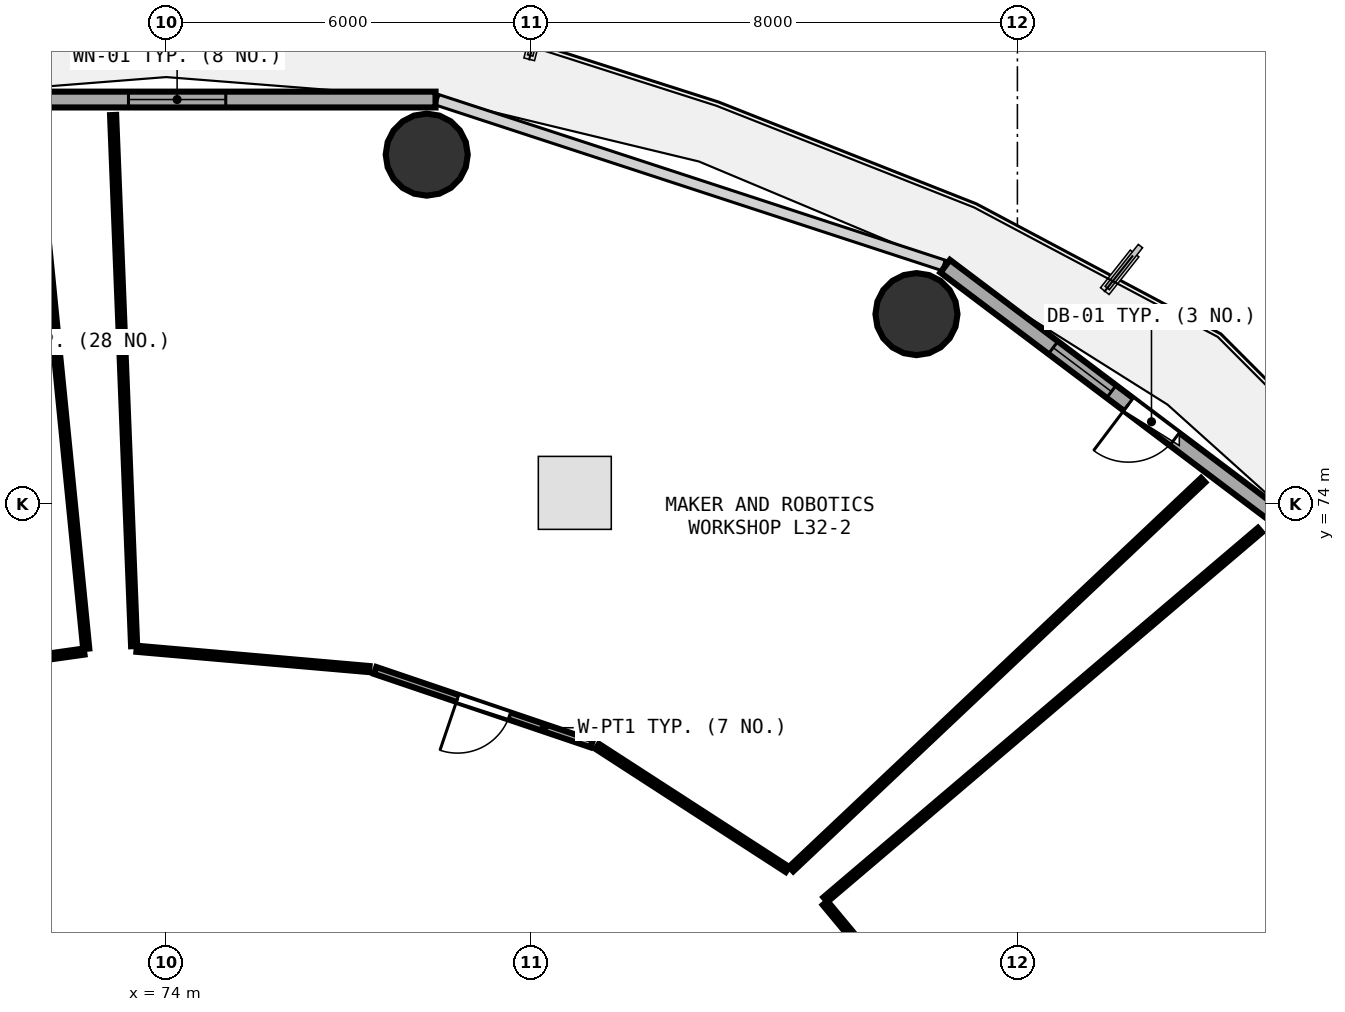
"""IFC4 building model, lengths in metres.
Left out: names, types, materials, properties, quantities, classifications, styles, units other than length and angle.
Written with IfcOpenShell. Run it as: python <this file> out.ifc"""

import sys

from ifc_helpers import new_model, si_unit, direction, frame, frame_2d, origin, origin_2d, place, context, subcontext, project, spatial, rectangle, circle, extrude, element, fill, save


model = new_model("IFC4")
c1 = context("Model", 3, precision=1e-05, world=origin(), true_north=direction((0.0, 1.0)))
c2 = subcontext(c1, "Body", "Model", "MODEL_VIEW")
j1 = project(units=[si_unit("LENGTHUNIT", "METRE"), si_unit("PLANEANGLEUNIT", "RADIAN")], contexts=[c1])
p1 = place(None, origin())
s1 = spatial("IfcSite", under=j1, at=p1, CompositionType="ELEMENT")
p2 = place(p1, origin())
s2 = spatial("IfcBuilding", under=s1, at=p2, CompositionType="ELEMENT")
p3 = place(p2, frame((0.0, 0.0, 125.1)))
s3 = spatial("IfcBuildingStorey", under=s2, at=p3, CompositionType="ELEMENT", Elevation=125.1)
for number, where, z_axis, x_axis in (
    (1, (86.34, 77.122, 0.0), (0.0, 0.0, 1.0), (1.0, 0.0, 0.0)),
    (2, (78.286, 79.745, 0.0), (0.0, 0.0, 1.0), (1.0, 0.0, 0.0)),
):
    element("IfcColumn", number, at=place(p3, frame(where, z_axis=z_axis, x_axis=x_axis)), inside=s3, PredefinedType="COLUMN", context=c2, shape_type="SweptSolid", body=[
        extrude(circle(Radius=0.675, at=origin_2d()), origin(), (0.0, 0.0, 1.0), 4.76),
    ])
p4 = place(p3, frame((93.599, 72.793, 0.0), z_axis=(0.0, 0.0, 1.0), x_axis=(-0.798501507879, 0.601992808857, 0.0)))
e3 = element("IfcWall", 3, at=p4, inside=s3, PredefinedType="SOLIDWALL", context=c2, shape_type="SweptSolid", body=[
    extrude(rectangle(XDim=8.499, YDim=0.26, at=frame_2d((4.25, 0.0))), origin(), (0.0, 0.0, 1.0), 4.345),
])
p5 = place(p4, frame((3.775, 0.0, 0.0)))
e4 = element("IfcOpeningElement", 4, at=p5, cuts=e3, PredefinedType="OPENING", context=c2, shape_type="SweptSolid", body=[
    extrude(rectangle(XDim=0.95, YDim=2.1, at=frame_2d((0.475, 1.05))), frame((0.0, 0.14, 0.0), z_axis=(0.0, -1.0, 0.0), x_axis=(1.0, 0.0, 0.0)), (0.0, 0.0, 1.0), 0.28),
])
p6 = place(p4, frame((5.075, 0.0, 0.85)))
e5 = element("IfcOpeningElement", 5, at=p6, cuts=e3, PredefinedType="OPENING", context=c2, shape_type="SweptSolid", body=[
    extrude(rectangle(XDim=1.2, YDim=1.45, at=frame_2d((0.6, 0.725))), frame((0.0, 0.14, 0.0), z_axis=(0.0, -1.0, 0.0), x_axis=(1.0, 0.0, 0.0)), (0.0, 0.0, 1.0), 0.28),
])
p7 = place(p3, frame((78.43, 80.651, 0.0), z_axis=(0.0, 0.0, 1.0), x_axis=(-1.0, 0.0, 0.0)))
e6 = element("IfcWall", 6, at=p7, inside=s3, PredefinedType="SOLIDWALL", context=c2, shape_type="SweptSolid", body=[
    extrude(rectangle(XDim=8.861, YDim=0.26, at=frame_2d((4.43, 0.0))), origin(), (0.0, 0.0, 1.0), 4.345),
])
p8 = place(p7, frame((3.45, 0.0, 0.85)))
e7 = element("IfcOpeningElement", 7, at=p8, cuts=e6, PredefinedType="OPENING", context=c2, shape_type="SweptSolid", body=[
    extrude(rectangle(XDim=1.6, YDim=1.45, at=frame_2d((0.8, 0.725))), frame((0.0, 0.14, 0.0), z_axis=(0.0, -1.0, 0.0), x_axis=(1.0, 0.0, 0.0)), (0.0, 0.0, 1.0), 0.28),
])
p9 = place(p3, frame((80.999, 70.054, 0.0), z_axis=(0.0, 0.0, 1.0), x_axis=(-0.947047812155, 0.321092574645, 0.0)))
e8 = element("IfcWall", 8, at=p9, inside=s3, PredefinedType="PARTITIONING", context=c2, shape_type="SweptSolid", body=[
    extrude(rectangle(XDim=3.761, YDim=0.12, at=frame_2d((1.88, 0.0))), origin(), (0.0, 0.0, 1.0), 2.345),
])
p10 = place(p9, frame((1.43, 0.0, 0.0)))
e9 = element("IfcOpeningElement", 9, at=p10, cuts=e8, PredefinedType="OPENING", context=c2, shape_type="SweptSolid", body=[
    extrude(rectangle(XDim=0.9, YDim=2.08, at=frame_2d((0.45, 1.04))), frame((0.0, 0.07, 0.0), z_axis=(0.0, -1.0, 0.0), x_axis=(1.0, 0.0, 0.0)), (0.0, 0.0, 1.0), 0.14),
])
p11 = place(p3, frame((86.99, 64.846, 0.0), z_axis=(0.0, 0.0, 1.0), x_axis=(-0.638993310166, 0.769212291609, 0.0)))
e10 = element("IfcWall", 10, at=p11, inside=s3, PredefinedType="PARTITIONING", context=c2, shape_type="SweptSolid", body=[
    extrude(rectangle(XDim=3.369, YDim=0.1, at=frame_2d((1.685, 0.0))), origin(), (0.0, 0.0, 1.0), 2.345),
])
p12 = place(p3, frame((84.843, 67.494, 0.0), z_axis=(0.0, 0.0, 1.0), x_axis=(0.761881513516, 0.647716418939, 0.0)))
e11 = element("IfcWall", 11, at=p12, inside=s3, PredefinedType="PARTITIONING", context=c2, shape_type="SweptSolid", body=[
    extrude(rectangle(XDim=9.379, YDim=0.1, at=frame_2d((4.69, 0.0))), origin(), (0.0, 0.0, 1.0), 2.345),
])
p13 = place(p3, frame((84.216, 67.99, 0.0), z_axis=(0.0, 0.0, 1.0), x_axis=(-0.839536739544, 0.54330292007, 0.0)))
e12 = element("IfcWall", 12, at=p13, inside=s3, PredefinedType="PARTITIONING", context=c2, shape_type="SweptSolid", body=[
    extrude(rectangle(XDim=3.724, YDim=0.1, at=frame_2d((1.862, 0.0))), origin(), (0.0, 0.0, 1.0), 2.345),
])
p14 = place(p3, frame((77.341, 71.284, 0.0), z_axis=(0.0, 0.0, 1.0), x_axis=(-0.996212391701, 0.086953266882, 0.0)))
e13 = element("IfcWall", 13, at=p14, inside=s3, PredefinedType="PARTITIONING", context=c2, shape_type="SweptSolid", body=[
    extrude(rectangle(XDim=3.841, YDim=0.1, at=frame_2d((1.92, 0.0))), origin(), (0.0, 0.0, 1.0), 4.35),
])
p15 = place(p3, frame((73.473, 71.662, 0.0), z_axis=(0.0, 0.0, 1.0), x_axis=(-0.039550848763, 0.999217559074, 0.0)))
e14 = element("IfcWall", 14, at=p15, inside=s3, PredefinedType="PARTITIONING", context=c2, shape_type="SweptSolid", body=[
    extrude(rectangle(XDim=8.741, YDim=0.1, at=frame_2d((4.37, 0.0))), origin(), (0.0, 0.0, 1.0), 2.345),
])
p16 = place(p3, frame((91.055, 74.392, 0.0), z_axis=(0.0, 0.0, 1.0), x_axis=(-0.727197691168, -0.686428086518, 0.0)))
e15 = element("IfcWall", 15, at=p16, inside=s3, PredefinedType="PARTITIONING", context=c2, shape_type="SweptSolid", body=[
    extrude(rectangle(XDim=9.318, YDim=0.1, at=frame_2d((4.659, 0.0))), origin(), (0.0, 0.0, 1.0), 2.345),
])
p17 = place(p3, frame((72.65, 71.573, 0.0), z_axis=(0.0, 0.0, 1.0), x_axis=(-0.990208987284, -0.139592841869, 0.0)))
e16 = element("IfcWall", 16, at=p17, inside=s3, PredefinedType="PARTITIONING", context=c2, shape_type="SweptSolid", body=[
    extrude(rectangle(XDim=1.926, YDim=0.1, at=frame_2d((0.963, 0.0))), origin(), (0.0, 0.0, 1.0), 2.345),
])
p18 = place(p3, frame((71.821, 80.325, 0.0), z_axis=(0.0, 0.0, 1.0), x_axis=(0.098854507854, -0.995101897434, 0.0)))
e17 = element("IfcWall", 17, at=p18, inside=s3, PredefinedType="PARTITIONING", context=c2, shape_type="SweptSolid", body=[
    extrude(rectangle(XDim=8.75, YDim=0.1, at=frame_2d((4.375, 0.0))), origin(), (0.0, 0.0, 1.0), 2.345),
])
p19 = place(p5, frame((0.95, 0.0, 0.0), z_axis=(0.0, 0.0, 1.0), x_axis=(-1.0, 0.0, 0.0)))
e18 = element("IfcDoor", 18, at=p19, inside=s3, OperationType="SINGLE_SWING_LEFT", PredefinedType="DOOR", context=c2, shape_type="SweptSolid", body=[
    extrude(rectangle(XDim=0.95, YDim=2.1, at=frame_2d((0.475, 1.05))), frame((0.0, 0.025, 0.0), z_axis=(0.0, -1.0, 0.0), x_axis=(1.0, 0.0, 0.0)), (0.0, 0.0, 1.0), 0.05),
])
fill(e4, e18)
p20 = place(p6, origin())
e19 = element("IfcWindow", 19, at=p20, inside=s3, PartitioningType="SINGLE_PANEL", PredefinedType="WINDOW", context=c2, shape_type="SweptSolid", body=[
    extrude(rectangle(XDim=1.2, YDim=1.45, at=frame_2d((0.6, 0.725))), frame((0.0, 0.03, 0.0), z_axis=(0.0, -1.0, 0.0), x_axis=(1.0, 0.0, 0.0)), (0.0, 0.0, 1.0), 0.06),
])
fill(e5, e19)
p21 = place(p8, origin())
e20 = element("IfcWindow", 20, at=p21, inside=s3, PartitioningType="SINGLE_PANEL", PredefinedType="WINDOW", context=c2, shape_type="SweptSolid", body=[
    extrude(rectangle(XDim=1.6, YDim=1.45, at=frame_2d((0.8, 0.725))), frame((0.0, 0.03, 0.0), z_axis=(0.0, -1.0, 0.0), x_axis=(1.0, 0.0, 0.0)), (0.0, 0.0, 1.0), 0.06),
])
fill(e7, e20)
p22 = place(p10, origin())
e21 = element("IfcDoor", 21, at=p22, inside=s3, OperationType="SINGLE_SWING_RIGHT", PredefinedType="DOOR", context=c2, shape_type="SweptSolid", body=[
    extrude(rectangle(XDim=0.9, YDim=2.08, at=frame_2d((0.45, 1.04))), frame((0.0, 0.025, 0.0), z_axis=(0.0, -1.0, 0.0), x_axis=(1.0, 0.0, 0.0)), (0.0, 0.0, 1.0), 0.05),
])
fill(e9, e21)
save(model, sys.argv[1])
